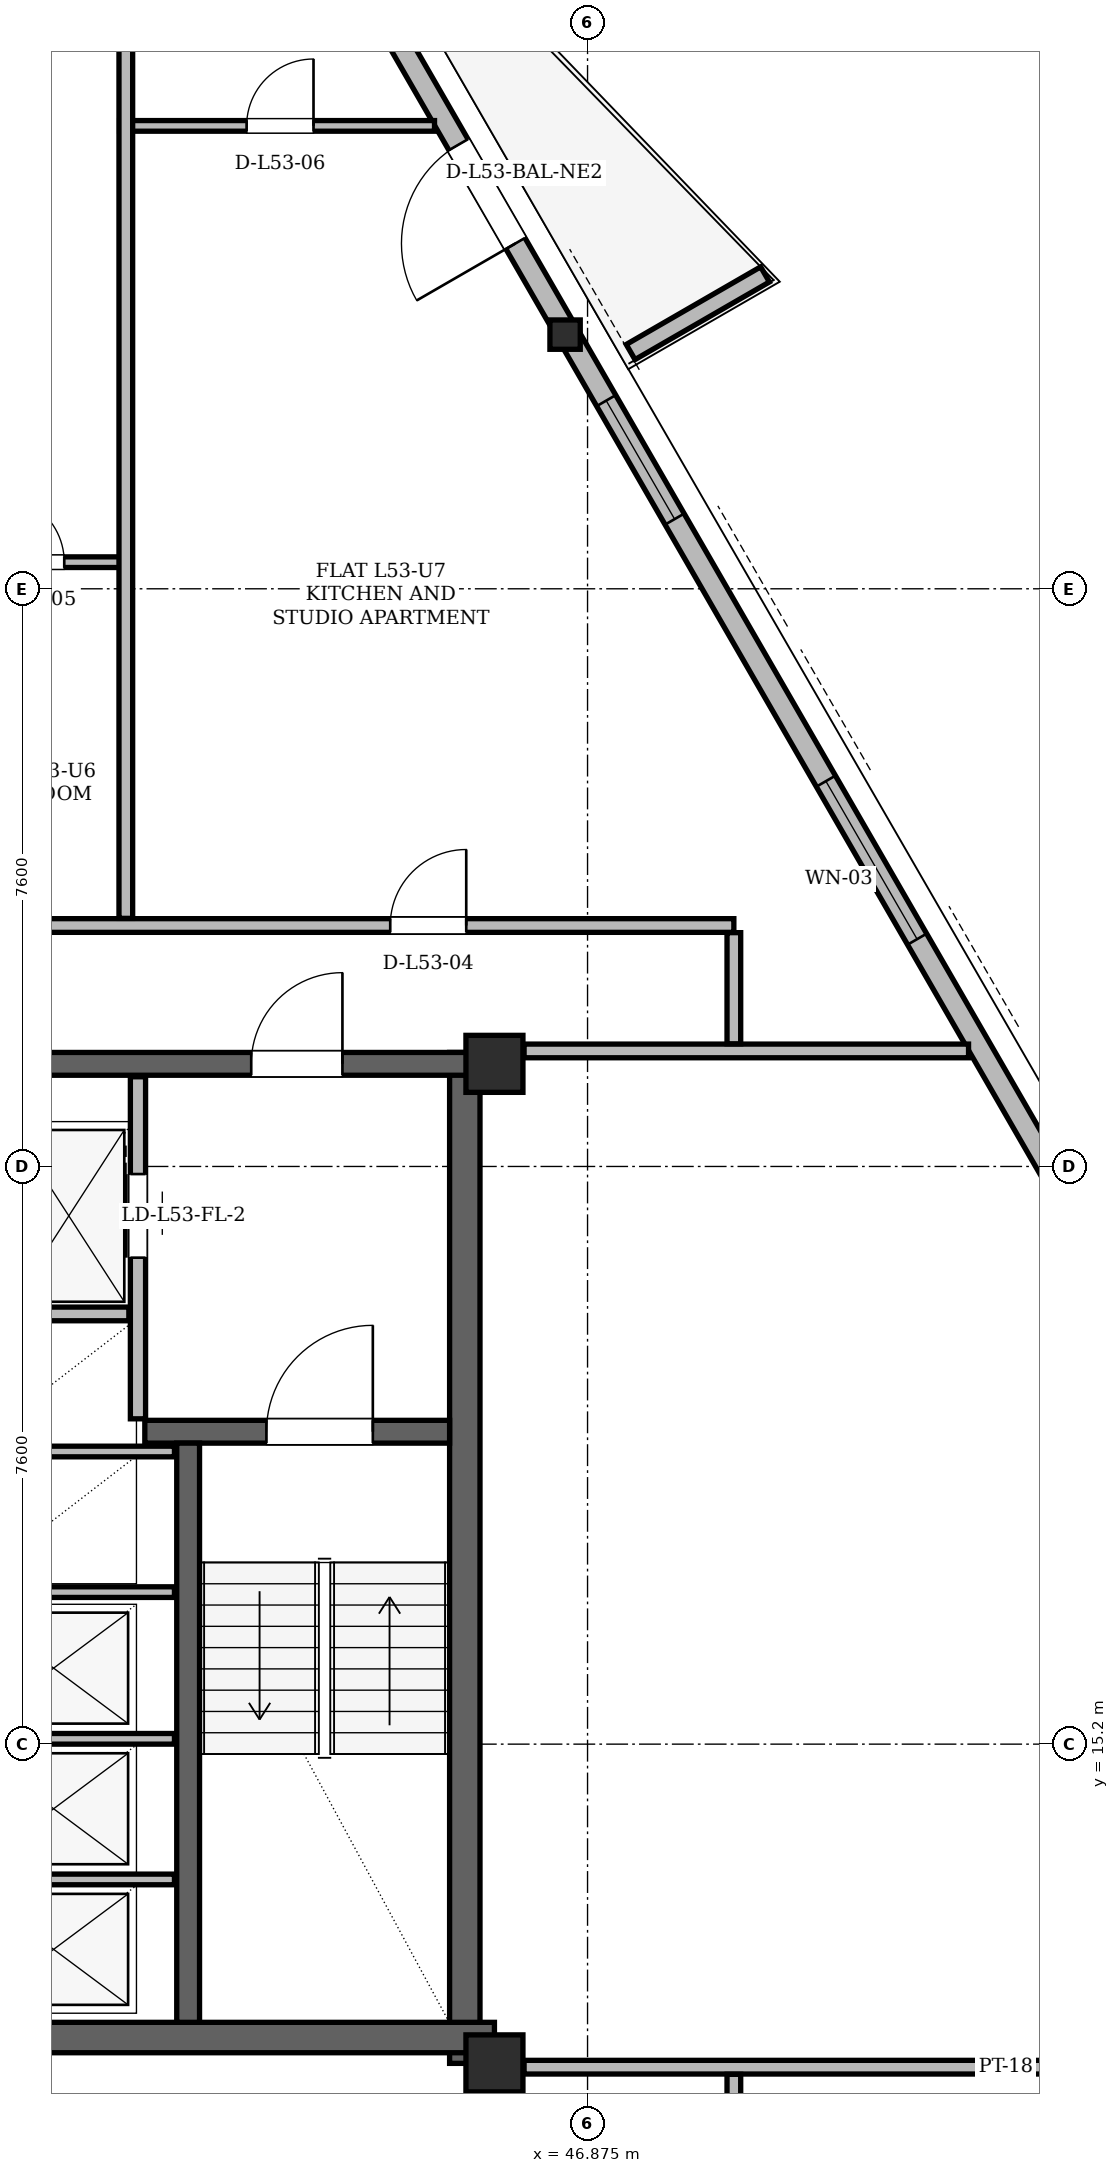
"""IFC4 building model, lengths in metres.
Left out: names, types, materials, properties, quantities, classifications, styles, units other than length and angle.
Written with IfcOpenShell. Run it as: python <this file> out.ifc"""

import sys

from ifc_helpers import new_model, si_unit, direction, frame, frame_2d, origin, origin_2d, place, context, subcontext, project, spatial, polyline, rectangle, hollow_rectangle, i_section, outline, extrude, element, fill, save


model = new_model("IFC4")
c1 = context("Model", 3, precision=1e-05, world=origin(), true_north=direction((0.0, 1.0)))
c2 = subcontext(c1, "Body", "Model", "MODEL_VIEW")
j1 = project(units=[si_unit("LENGTHUNIT", "METRE"), si_unit("PLANEANGLEUNIT", "RADIAN")], contexts=[c1])
p1 = place(None, origin())
s1 = spatial("IfcSite", under=j1, at=p1, CompositionType="ELEMENT")
p2 = place(p1, origin())
s2 = spatial("IfcBuilding", under=s1, at=p2, CompositionType="ELEMENT")
p3 = place(p2, frame((0.0, 0.0, 201.0)))
s3 = spatial("IfcBuildingStorey", under=s2, at=p3, CompositionType="ELEMENT", Elevation=201.0)
for number, where, z_axis, x_axis in (
    (1, (45.65, 11.0, 0.0), (0.0, 0.0, 1.0), (1.0, 0.0, 0.0)),
    (2, (45.65, 24.15, 0.0), (0.0, 0.0, 1.0), (1.0, 0.0, 0.0)),
):
    element("IfcColumn", number, at=place(p3, frame(where, z_axis=z_axis, x_axis=x_axis)), inside=s3, PredefinedType="COLUMN", context=c2, shape_type="SweptSolid", body=[
        extrude(hollow_rectangle(XDim=0.75, YDim=0.75, WallThickness=0.06, at=origin_2d()), origin(), (0.0, 0.0, 1.0), 3.6),
    ])
p4 = place(p3, frame((46.612, 33.756, 0.004), z_axis=(-0.018148742632, -0.006797281885, 0.999812192414), x_axis=(0.350739040452, -0.936473238007, 0.0)))
e3 = element("IfcColumn", 3, at=p4, inside=s3, PredefinedType="COLUMN", context=c2, shape_type="SweptSolid", body=[
    extrude(i_section(OverallWidth=0.399, OverallDepth=0.386, WebThickness=0.021, FlangeThickness=0.033, at=origin_2d()), origin(), (0.0, 0.0, 1.0), 3.592),
])
p5 = place(p3, frame((45.26, 11.0, 0.0), z_axis=(0.0, 0.0, 1.0), x_axis=(0.0, 1.0, 0.0)))
e4 = element("IfcWall", 4, at=p5, inside=s3, PredefinedType="SHEAR", context=c2, shape_type="SweptSolid", body=[
    extrude(rectangle(XDim=13.3, YDim=0.4, at=frame_2d((6.65, 0.0))), origin(), (0.0, 0.0, 1.0), 3.38),
])
p6 = place(p3, frame((38.55, 11.34, 0.0), z_axis=(0.0, 0.0, 1.0), x_axis=(1.0, 0.0, 0.0)))
e5 = element("IfcWall", 5, at=p6, inside=s3, PredefinedType="SHEAR", context=c2, shape_type="SweptSolid", body=[
    extrude(rectangle(XDim=7.1, YDim=0.4, at=frame_2d((3.55, 0.0))), origin(), (0.0, 0.0, 1.0), 3.38),
])
p7 = place(p3, frame((29.65, 24.15, 0.0), z_axis=(0.0, 0.0, 1.0), x_axis=(1.0, 0.0, 0.0)))
e6 = element("IfcWall", 6, at=p7, inside=s3, PredefinedType="SHEAR", context=c2, shape_type="SweptSolid", body=[
    extrude(rectangle(XDim=15.7, YDim=0.3, at=frame_2d((7.85, 0.0))), origin(), (0.0, 0.0, 1.0), 3.38),
])
p8 = place(p7, frame((1.7, 0.0, 0.0)))
e7 = element("IfcOpeningElement", 7, at=p8, cuts=e6, PredefinedType="OPENING", context=c2, shape_type="SweptSolid", body=[
    extrude(rectangle(XDim=1.2, YDim=2.2, at=frame_2d((0.6, 1.1))), frame((0.0, 0.15, 0.0), z_axis=(0.0, -1.0, 0.0), x_axis=(1.0, 0.0, 0.0)), (0.0, 0.0, 1.0), 0.3),
])
p9 = place(p7, frame((12.8, 0.0, 0.0)))
e8 = element("IfcOpeningElement", 8, at=p9, cuts=e6, PredefinedType="OPENING", context=c2, shape_type="SweptSolid", body=[
    extrude(rectangle(XDim=1.2, YDim=2.2, at=frame_2d((0.6, 1.1))), frame((0.0, 0.15, 0.0), z_axis=(0.0, -1.0, 0.0), x_axis=(1.0, 0.0, 0.0)), (0.0, 0.0, 1.0), 0.3),
])
p10 = place(p7, frame((6.55, 0.0, 0.0)))
e9 = element("IfcOpeningElement", 9, at=p10, cuts=e6, PredefinedType="OPENING", context=c2, shape_type="SweptSolid", body=[
    extrude(rectangle(XDim=0.9, YDim=2.05, at=frame_2d((0.45, 1.025))), frame((0.0, 0.15, 0.0), z_axis=(0.0, -1.0, 0.0), x_axis=(1.0, 0.0, 0.0)), (0.0, 0.0, 1.0), 0.3),
])
p11 = place(p7, frame((8.45, 0.0, 0.0)))
e10 = element("IfcOpeningElement", 10, at=p11, cuts=e6, PredefinedType="OPENING", context=c2, shape_type="SweptSolid", body=[
    extrude(rectangle(XDim=0.9, YDim=2.05, at=frame_2d((0.45, 1.025))), frame((0.0, 0.15, 0.0), z_axis=(0.0, -1.0, 0.0), x_axis=(1.0, 0.0, 0.0)), (0.0, 0.0, 1.0), 0.3),
])
p12 = place(p3, frame((41.05, 19.31, 0.0), z_axis=(0.0, 0.0, 1.0), x_axis=(1.0, 0.0, 0.0)))
e11 = element("IfcWall", 11, at=p12, inside=s3, PredefinedType="SHEAR", context=c2, shape_type="SweptSolid", body=[
    extrude(rectangle(XDim=4.01, YDim=0.3, at=frame_2d((2.005, 0.0))), origin(), (0.0, 0.0, 1.0), 3.38),
])
p13 = place(p12, frame((1.6, 0.0, 0.0)))
e12 = element("IfcOpeningElement", 12, at=p13, cuts=e11, PredefinedType="OPENING", context=c2, shape_type="SweptSolid", body=[
    extrude(rectangle(XDim=1.4, YDim=2.2, at=frame_2d((0.7, 1.1))), frame((0.0, 0.15, 0.0), z_axis=(0.0, -1.0, 0.0), x_axis=(1.0, 0.0, 0.0)), (0.0, 0.0, 1.0), 0.3),
])
p14 = place(p3, frame((41.62, 11.54, 0.0), z_axis=(0.0, 0.0, 1.0), x_axis=(0.0, 1.0, 0.0)))
e13 = element("IfcWall", 13, at=p14, inside=s3, PredefinedType="SHEAR", context=c2, shape_type="SweptSolid", body=[
    extrude(rectangle(XDim=7.62, YDim=0.3, at=frame_2d((3.81, 0.0))), origin(), (0.0, 0.0, 1.0), 3.38),
])
p15 = place(p3, frame((59.335, 11.719, 0.0), z_axis=(0.0, 0.0, 1.0), x_axis=(-0.500001310321, 0.866024647269, 0.0)))
e14 = element("IfcWall", 14, at=p15, inside=s3, PredefinedType="SOLIDWALL", context=c2, shape_type="SweptSolid", body=[
    extrude(rectangle(XDim=36.352, YDim=0.29, at=frame_2d((18.176, 0.0))), origin(), (0.0, 0.0, 1.0), 2.677),
])
p16 = place(p15, frame((6.579, 0.0, 0.0)))
e15 = element("IfcOpeningElement", 15, at=p16, cuts=e14, PredefinedType="OPENING", context=c2, shape_type="SweptSolid", body=[
    extrude(rectangle(XDim=1.5, YDim=2.2, at=frame_2d((0.75, 1.1))), frame((0.0, 0.145, 0.0), z_axis=(0.0, -1.0, 0.0), x_axis=(1.0, 0.0, 0.0)), (0.0, 0.0, 1.0), 0.29),
])
p17 = place(p15, frame((26.817, 0.0, 0.0)))
e16 = element("IfcOpeningElement", 16, at=p17, cuts=e14, PredefinedType="OPENING", context=c2, shape_type="SweptSolid", body=[
    extrude(rectangle(XDim=1.5, YDim=2.2, at=frame_2d((0.75, 1.1))), frame((0.0, 0.145, 0.0), z_axis=(0.0, -1.0, 0.0), x_axis=(1.0, 0.0, 0.0)), (0.0, 0.0, 1.0), 0.29),
])
p18 = place(p15, frame((34.299, 0.0, 0.85)))
e17 = element("IfcOpeningElement", 17, at=p18, cuts=e14, PredefinedType="OPENING", context=c2, shape_type="SweptSolid", body=[
    extrude(rectangle(XDim=1.2, YDim=1.48, at=frame_2d((0.6, 0.74))), frame((0.0, 0.145, 0.0), z_axis=(0.0, -1.0, 0.0), x_axis=(1.0, 0.0, 0.0)), (0.0, 0.0, 1.0), 0.29),
])
p19 = place(p15, frame((16.249, 0.0, 0.85)))
e18 = element("IfcOpeningElement", 18, at=p19, cuts=e14, PredefinedType="OPENING", context=c2, shape_type="SweptSolid", body=[
    extrude(rectangle(XDim=2.4, YDim=1.717, at=frame_2d((1.2, 0.858))), frame((0.0, 0.145, 0.0), z_axis=(0.0, -1.0, 0.0), x_axis=(1.0, 0.0, 0.0)), (0.0, 0.0, 1.0), 0.29),
])
p20 = place(p15, frame((22.63, 0.0, 0.85)))
e19 = element("IfcOpeningElement", 19, at=p20, cuts=e14, PredefinedType="OPENING", context=c2, shape_type="SweptSolid", body=[
    extrude(rectangle(XDim=1.8, YDim=1.717, at=frame_2d((0.9, 0.858))), frame((0.0, 0.145, 0.0), z_axis=(0.0, -1.0, 0.0), x_axis=(1.0, 0.0, 0.0)), (0.0, 0.0, 1.0), 0.29),
])
p21 = place(p15, frame((32.084, 0.0, 0.85)))
e20 = element("IfcOpeningElement", 20, at=p21, cuts=e14, PredefinedType="OPENING", context=c2, shape_type="SweptSolid", body=[
    extrude(rectangle(XDim=1.6, YDim=1.7, at=frame_2d((0.8, 0.85))), frame((0.0, 0.145, 0.0), z_axis=(0.0, -1.0, 0.0), x_axis=(1.0, 0.0, 0.0)), (0.0, 0.0, 1.0), 0.29),
])
p22 = place(p3, frame((47.442, 33.515, 0.0), z_axis=(0.0, 0.0, 1.0), x_axis=(0.866012356593, 0.500022597718, 0.0)))
e21 = element("IfcWall", 21, at=p22, inside=s3, PredefinedType="PARAPET", context=c2, shape_type="SweptSolid", body=[
    extrude(outline(polyline([(0.0, 0.0), (2.042, 0.0), (2.042, 1.1), (0.0, 1.32), (0.0, 0.0)])), frame((0.0, 0.115, 0.0), z_axis=(0.0, -1.0, 0.0), x_axis=(1.0, 0.0, 0.0)), (0.0, 0.0, 1.0), 0.23),
])
p23 = place(p3, frame((40.96, 19.48, 0.0), z_axis=(0.0, 0.0, 1.0), x_axis=(0.0, 1.0, 0.0)))
e22 = element("IfcWall", 22, at=p23, inside=s3, PredefinedType="PARTITIONING", context=c2, shape_type="SweptSolid", body=[
    extrude(rectangle(XDim=4.5, YDim=0.2, at=frame_2d((2.25, 0.0))), origin(), (0.0, 0.0, 1.0), 3.38),
])
p24 = place(p23, frame((2.12, 0.0, 0.0)))
e23 = element("IfcOpeningElement", 23, at=p24, cuts=e22, PredefinedType="OPENING", context=c2, shape_type="SweptSolid", body=[
    extrude(rectangle(XDim=1.1, YDim=2.2, at=frame_2d((0.55, 1.1))), frame((0.0, 0.1, 0.0), z_axis=(0.0, -1.0, 0.0), x_axis=(1.0, 0.0, 0.0)), (0.0, 0.0, 1.0), 0.2),
])
p25 = place(p3, frame((39.26, 20.86, 0.0), z_axis=(0.0, 0.0, 1.0), x_axis=(1.0, 0.0, 0.0)))
e24 = element("IfcWall", 24, at=p25, inside=s3, PredefinedType="PARTITIONING", context=c2, shape_type="SweptSolid", body=[
    extrude(rectangle(XDim=1.58, YDim=0.18, at=frame_2d((0.79, 0.0))), origin(), (0.0, 0.0, 1.0), 3.38),
])
for number, where, z_axis, x_axis in (
    (25, (38.78, 13.42, 0.0), (0.0, 0.0, 1.0), (1.0, 0.0, 0.0)),
    (26, (38.78, 15.27, 0.0), (0.0, 0.0, 1.0), (1.0, 0.0, 0.0)),
    (27, (38.78, 17.2, 0.0), (0.0, 0.0, 1.0), (1.0, 0.0, 0.0)),
    (28, (38.78, 19.05, 0.0), (0.0, 0.0, 1.0), (1.0, 0.0, 0.0)),
):
    element("IfcWall", number, at=place(p3, frame(where, z_axis=z_axis, x_axis=x_axis)), inside=s3, PredefinedType="PARTITIONING", context=c2, shape_type="SweptSolid", body=[
        extrude(rectangle(XDim=2.66, YDim=0.14, at=frame_2d((1.33, 0.0))), origin(), (0.0, 0.0, 1.0), 3.38),
    ])
p26 = place(p3, frame((46.04, 10.95, 0.0), z_axis=(0.0, 0.0, 1.0), x_axis=(1.0, 0.0, 0.0)))
e29 = element("IfcWall", 29, at=p26, inside=s3, PredefinedType="PARTITIONING", context=c2, shape_type="SweptSolid", body=[
    extrude(rectangle(XDim=12.679, YDim=0.18, at=frame_2d((6.34, 0.0))), origin(), (0.0, 0.0, 1.0), 2.913),
])
p27 = place(p3, frame((46.04, 24.32, 0.0), z_axis=(0.0, 0.0, 1.0), x_axis=(1.0, 0.0, 0.0)))
e30 = element("IfcWall", 30, at=p27, inside=s3, PredefinedType="PARTITIONING", context=c2, shape_type="SweptSolid", body=[
    extrude(rectangle(XDim=5.848, YDim=0.18, at=frame_2d((2.924, 0.0))), origin(), (0.0, 0.0, 1.0), 3.38),
])
p28 = place(p3, frame((38.3, 25.97, 0.0), z_axis=(0.0, 0.0, 1.0), x_axis=(1.0, 0.0, 0.0)))
e31 = element("IfcWall", 31, at=p28, inside=s3, PredefinedType="PARTITIONING", context=c2, shape_type="SweptSolid", body=[
    extrude(rectangle(XDim=10.5, YDim=0.18, at=frame_2d((5.25, 0.0))), origin(), (0.0, 0.0, 1.0), 2.913),
])
p29 = place(p28, frame((5.979, 0.0, 0.0)))
e32 = element("IfcOpeningElement", 32, at=p29, cuts=e31, PredefinedType="OPENING", context=c2, shape_type="SweptSolid", body=[
    extrude(rectangle(XDim=1.0, YDim=2.18, at=frame_2d((0.5, 1.09))), frame((0.0, 0.09, 0.0), z_axis=(0.0, -1.0, 0.0), x_axis=(1.0, 0.0, 0.0)), (0.0, 0.0, 1.0), 0.18),
])
p30 = place(p3, frame((38.218, 30.75, 0.0), z_axis=(0.0, 0.0, 1.0), x_axis=(1.0, 0.0, 0.0)))
e33 = element("IfcWall", 33, at=p30, inside=s3, PredefinedType="PARTITIONING", context=c2, shape_type="SweptSolid", body=[
    extrude(rectangle(XDim=2.664, YDim=0.14, at=frame_2d((1.332, 0.0))), origin(), (0.0, 0.0, 1.0), 3.38),
])
p31 = place(p30, frame((0.892, 0.0, 0.0)))
e34 = element("IfcOpeningElement", 34, at=p31, cuts=e33, PredefinedType="OPENING", context=c2, shape_type="SweptSolid", body=[
    extrude(rectangle(XDim=0.88, YDim=2.08, at=frame_2d((0.44, 1.04))), frame((0.0, 0.07, 0.0), z_axis=(0.0, -1.0, 0.0), x_axis=(1.0, 0.0, 0.0)), (0.0, 0.0, 1.0), 0.14),
])
p32 = place(p3, frame((40.718, 36.49, 0.0), z_axis=(0.0, 0.0, 1.0), x_axis=(1.0, 0.0, 0.0)))
e35 = element("IfcWall", 35, at=p32, inside=s3, PredefinedType="PARTITIONING", context=c2, shape_type="SweptSolid", body=[
    extrude(rectangle(XDim=4.144, YDim=0.14, at=frame_2d((2.072, 0.0))), origin(), (0.0, 0.0, 1.0), 2.913),
])
p33 = place(p32, frame((1.671, 0.0, 0.0)))
e36 = element("IfcOpeningElement", 36, at=p33, cuts=e35, PredefinedType="OPENING", context=c2, shape_type="SweptSolid", body=[
    extrude(rectangle(XDim=0.88, YDim=2.08, at=frame_2d((0.44, 1.04))), frame((0.0, 0.07, 0.0), z_axis=(0.0, -1.0, 0.0), x_axis=(1.0, 0.0, 0.0)), (0.0, 0.0, 1.0), 0.14),
])
p34 = place(p3, frame((40.8, 26.064, 0.0), z_axis=(0.0, 0.0, 1.0), x_axis=(0.0, 1.0, 0.0)))
e37 = element("IfcWall", 37, at=p34, inside=s3, PredefinedType="PARTITIONING", context=c2, shape_type="SweptSolid", body=[
    extrude(rectangle(XDim=16.767, YDim=0.18, at=frame_2d((8.383, 0.0))), origin(), (0.0, 0.0, 1.0), 3.38),
])
for number, where, z_axis, x_axis in (
    (38, (48.8, 9.394, 0.0), (0.0, 0.0, 1.0), (0.0, 1.0, 0.0)),
    (39, (48.8, 24.414, 0.0), (0.0, 0.0, 1.0), (0.0, 1.0, 0.0)),
):
    element("IfcWall", number, at=place(p3, frame(where, z_axis=z_axis, x_axis=x_axis)), inside=s3, PredefinedType="PARTITIONING", context=c2, shape_type="SweptSolid", body=[
        extrude(rectangle(XDim=1.462, YDim=0.18, at=frame_2d((0.731, 0.0))), origin(), (0.0, 0.0, 1.0), 3.38),
    ])
p35 = place(p17, origin())
e40 = element("IfcDoor", 40, at=p35, inside=s3, OperationType="SINGLE_SWING_LEFT", PredefinedType="DOOR", context=c2, shape_type="SweptSolid", body=[
    extrude(rectangle(XDim=1.5, YDim=2.2, at=frame_2d((0.75, 1.1))), frame((0.0, 0.025, 0.0), z_axis=(0.0, -1.0, 0.0), x_axis=(1.0, 0.0, 0.0)), (0.0, 0.0, 1.0), 0.05),
])
fill(e16, e40)
p36 = place(p19, origin())
e41 = element("IfcWindow", 41, at=p36, inside=s3, PartitioningType="SINGLE_PANEL", PredefinedType="WINDOW", context=c2, shape_type="SweptSolid", body=[
    extrude(rectangle(XDim=2.4, YDim=1.717, at=frame_2d((1.2, 0.858))), frame((0.0, 0.03, 0.0), z_axis=(0.0, -1.0, 0.0), x_axis=(1.0, 0.0, 0.0)), (0.0, 0.0, 1.0), 0.06),
])
fill(e18, e41)
p37 = place(p20, origin())
e42 = element("IfcWindow", 42, at=p37, inside=s3, PartitioningType="SINGLE_PANEL", PredefinedType="WINDOW", context=c2, shape_type="SweptSolid", body=[
    extrude(rectangle(XDim=1.8, YDim=1.717, at=frame_2d((0.9, 0.858))), frame((0.0, 0.03, 0.0), z_axis=(0.0, -1.0, 0.0), x_axis=(1.0, 0.0, 0.0)), (0.0, 0.0, 1.0), 0.06),
])
fill(e19, e42)
p38 = place(p24, origin())
e43 = element("IfcDoor", 43, at=p38, inside=s3, OperationType="SLIDING_TO_RIGHT", PredefinedType="DOOR", context=c2, shape_type="SweptSolid", body=[
    extrude(rectangle(XDim=1.1, YDim=2.2, at=frame_2d((0.55, 1.1))), frame((0.0, 0.025, 0.0), z_axis=(0.0, -1.0, 0.0), x_axis=(1.0, 0.0, 0.0)), (0.0, 0.0, 1.0), 0.05),
])
fill(e23, e43)
p39 = place(p13, origin())
e44 = element("IfcDoor", 44, at=p39, inside=s3, OperationType="SINGLE_SWING_RIGHT", PredefinedType="DOOR", context=c2, shape_type="SweptSolid", body=[
    extrude(rectangle(XDim=1.4, YDim=2.2, at=frame_2d((0.7, 1.1))), frame((0.0, 0.025, 0.0), z_axis=(0.0, -1.0, 0.0), x_axis=(1.0, 0.0, 0.0)), (0.0, 0.0, 1.0), 0.05),
])
fill(e12, e44)
p40 = place(p9, origin())
e45 = element("IfcDoor", 45, at=p40, inside=s3, OperationType="SINGLE_SWING_RIGHT", PredefinedType="DOOR", context=c2, shape_type="SweptSolid", body=[
    extrude(rectangle(XDim=1.2, YDim=2.2, at=frame_2d((0.6, 1.1))), frame((0.0, 0.025, 0.0), z_axis=(0.0, -1.0, 0.0), x_axis=(1.0, 0.0, 0.0)), (0.0, 0.0, 1.0), 0.05),
])
fill(e8, e45)
p41 = place(p29, origin())
e46 = element("IfcDoor", 46, at=p41, inside=s3, OperationType="SINGLE_SWING_RIGHT", PredefinedType="DOOR", context=c2, shape_type="SweptSolid", body=[
    extrude(rectangle(XDim=1.0, YDim=2.18, at=frame_2d((0.5, 1.09))), frame((0.0, 0.025, 0.0), z_axis=(0.0, -1.0, 0.0), x_axis=(1.0, 0.0, 0.0)), (0.0, 0.0, 1.0), 0.05),
])
fill(e32, e46)
p42 = place(p31, origin())
e47 = element("IfcDoor", 47, at=p42, inside=s3, OperationType="SINGLE_SWING_LEFT", PredefinedType="DOOR", context=c2, shape_type="SweptSolid", body=[
    extrude(rectangle(XDim=0.88, YDim=2.08, at=frame_2d((0.44, 1.04))), frame((0.0, 0.025, 0.0), z_axis=(0.0, -1.0, 0.0), x_axis=(1.0, 0.0, 0.0)), (0.0, 0.0, 1.0), 0.05),
])
fill(e34, e47)
p43 = place(p33, origin())
e48 = element("IfcDoor", 48, at=p43, inside=s3, OperationType="SINGLE_SWING_RIGHT", PredefinedType="DOOR", context=c2, shape_type="SweptSolid", body=[
    extrude(rectangle(XDim=0.88, YDim=2.08, at=frame_2d((0.44, 1.04))), frame((0.0, 0.025, 0.0), z_axis=(0.0, -1.0, 0.0), x_axis=(1.0, 0.0, 0.0)), (0.0, 0.0, 1.0), 0.05),
])
fill(e36, e48)
save(model, sys.argv[1])
